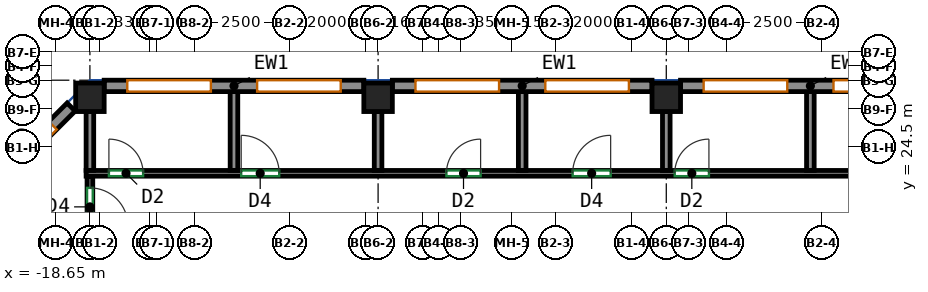
"""IFC4 building model, lengths in metres.
Left out: names, types, materials, properties, quantities, classifications, styles, units other than length and angle.
Written with IfcOpenShell. Run it as: python <this file> out.ifc"""

import sys

from ifc_helpers import new_model, si_unit, direction, frame, frame_2d, origin, origin_2d, place, context, subcontext, project, spatial, rectangle, extrude, source, transform, mapped, element, fill, save


model = new_model("IFC4")
c1 = context("Model", 3, precision=1e-05, world=origin(), true_north=direction((0.0, 1.0)))
c2 = subcontext(c1, "Body", "Model", "MODEL_VIEW")
j1 = project(units=[si_unit("LENGTHUNIT", "METRE"), si_unit("PLANEANGLEUNIT", "RADIAN")], contexts=[c1])
p1 = place(None, origin())
s1 = spatial("IfcSite", under=j1, at=p1, CompositionType="ELEMENT")
p2 = place(p1, origin())
s2 = spatial("IfcBuilding", under=s1, at=p2, CompositionType="ELEMENT")
p3 = place(p2, frame((0.0, 0.0, 203.3)))
s3 = spatial("IfcBuildingStorey", under=s2, at=p3, CompositionType="ELEMENT", Elevation=203.3)
m1 = source(origin(), c2, "Body", "SweptSolid", [
    extrude(rectangle(XDim=0.75, YDim=0.75, at=origin_2d()), origin(), (0.0, 0.0, 1.0), 3.12),
])
for number, where, z_axis, x_axis in (
    (1, (-17.75, 25.8, 0.0), (0.0, 0.0, 1.0), (1.0, 0.0, 0.0)),
    (2, (-10.167, 25.8, 0.0), (0.0, 0.0, 1.0), (1.0, 0.0, 0.0)),
    (3, (-2.583, 25.8, 0.0), (0.0, 0.0, 1.0), (1.0, 0.0, 0.0)),
):
    element("IfcColumn", number, at=place(p3, frame(where, z_axis=z_axis, x_axis=x_axis)), inside=s3, PredefinedType="COLUMN", context=c2, shape_type="MappedRepresentation", body=[
        mapped(m1, transform((0.0, 0.0, 0.0))),
    ])
m2 = source(origin(), c2, "Body", "SweptSolid", [
    extrude(rectangle(XDim=6.833, YDim=0.3, at=frame_2d((3.417, 0.0))), origin(), (0.0, 0.0, 1.0), 3.12),
])
p4 = place(p3, frame((4.625, 26.1, 0.0), z_axis=(0.0, 0.0, 1.0), x_axis=(-1.0, 0.0, 0.0)))
e4 = element("IfcWall", 4, at=p4, inside=s3, PredefinedType="SOLIDWALL", context=c2, shape_type="MappedRepresentation", body=[
    mapped(m2, transform((0.0, 0.0, 0.0))),
])
p5 = place(p4, frame((0.608, 0.0, 0.85)))
e5 = element("IfcOpeningElement", 5, at=p5, cuts=e4, PredefinedType="OPENING", context=c2, shape_type="SweptSolid", body=[
    extrude(rectangle(XDim=2.2, YDim=1.95, at=frame_2d((1.1, 0.975))), frame((0.0, 0.16, 0.0), z_axis=(0.0, -1.0, 0.0), x_axis=(1.0, 0.0, 0.0)), (0.0, 0.0, 1.0), 0.32),
])
p6 = place(p4, frame((4.025, 0.0, 0.85)))
e6 = element("IfcOpeningElement", 6, at=p6, cuts=e4, PredefinedType="OPENING", context=c2, shape_type="SweptSolid", body=[
    extrude(rectangle(XDim=2.2, YDim=1.95, at=frame_2d((1.1, 0.975))), frame((0.0, 0.16, 0.0), z_axis=(0.0, -1.0, 0.0), x_axis=(1.0, 0.0, 0.0)), (0.0, 0.0, 1.0), 0.32),
])
m3 = source(origin(), c2, "Body", "SweptSolid", [
    extrude(rectangle(XDim=6.833, YDim=0.3, at=frame_2d((3.417, 0.0))), origin(), (0.0, 0.0, 1.0), 3.12),
])
p7 = place(p3, frame((-2.958, 26.1, 0.0), z_axis=(0.0, 0.0, 1.0), x_axis=(-1.0, 0.0, 0.0)))
e7 = element("IfcWall", 7, at=p7, inside=s3, PredefinedType="SOLIDWALL", context=c2, shape_type="MappedRepresentation", body=[
    mapped(m3, transform((0.0, 0.0, 0.0))),
])
p8 = place(p7, frame((0.608, 0.0, 0.85)))
e8 = element("IfcOpeningElement", 8, at=p8, cuts=e7, PredefinedType="OPENING", context=c2, shape_type="SweptSolid", body=[
    extrude(rectangle(XDim=2.2, YDim=1.95, at=frame_2d((1.1, 0.975))), frame((0.0, 0.16, 0.0), z_axis=(0.0, -1.0, 0.0), x_axis=(1.0, 0.0, 0.0)), (0.0, 0.0, 1.0), 0.32),
])
p9 = place(p7, frame((4.025, 0.0, 0.85)))
e9 = element("IfcOpeningElement", 9, at=p9, cuts=e7, PredefinedType="OPENING", context=c2, shape_type="SweptSolid", body=[
    extrude(rectangle(XDim=2.2, YDim=1.95, at=frame_2d((1.1, 0.975))), frame((0.0, 0.16, 0.0), z_axis=(0.0, -1.0, 0.0), x_axis=(1.0, 0.0, 0.0)), (0.0, 0.0, 1.0), 0.32),
])
p10 = place(p3, frame((-10.542, 26.1, 0.0), z_axis=(0.0, 0.0, 1.0), x_axis=(-1.0, 0.0, 0.0)))
e10 = element("IfcWall", 10, at=p10, inside=s3, PredefinedType="SOLIDWALL", context=c2, shape_type="MappedRepresentation", body=[
    mapped(m2, transform((0.0, 0.0, 0.0))),
])
p11 = place(p10, frame((0.608, 0.0, 0.85)))
e11 = element("IfcOpeningElement", 11, at=p11, cuts=e10, PredefinedType="OPENING", context=c2, shape_type="SweptSolid", body=[
    extrude(rectangle(XDim=2.2, YDim=1.95, at=frame_2d((1.1, 0.975))), frame((0.0, 0.16, 0.0), z_axis=(0.0, -1.0, 0.0), x_axis=(1.0, 0.0, 0.0)), (0.0, 0.0, 1.0), 0.32),
])
p12 = place(p10, frame((4.025, 0.0, 0.85)))
e12 = element("IfcOpeningElement", 12, at=p12, cuts=e10, PredefinedType="OPENING", context=c2, shape_type="SweptSolid", body=[
    extrude(rectangle(XDim=2.2, YDim=1.95, at=frame_2d((1.1, 0.975))), frame((0.0, 0.16, 0.0), z_axis=(0.0, -1.0, 0.0), x_axis=(1.0, 0.0, 0.0)), (0.0, 0.0, 1.0), 0.32),
])
m4 = source(origin(), c2, "Body", "SweptSolid", [
    extrude(rectangle(XDim=3.571, YDim=0.3, at=frame_2d((1.786, 0.0))), origin(), (0.0, 0.0, 1.0), 3.12),
])
p13 = place(p3, frame((-18.244, 25.544, 0.0), z_axis=(0.0, 0.0, 1.0), x_axis=(-0.707072595841, -0.707140964879, 0.0)))
e13 = element("IfcWall", 13, at=p13, inside=s3, PredefinedType="SOLIDWALL", context=c2, shape_type="MappedRepresentation", body=[
    mapped(m4, transform((0.0, 0.0, 0.0))),
])
p14 = place(p13, frame((0.686, 0.0, 0.85)))
e14 = element("IfcOpeningElement", 14, at=p14, cuts=e13, PredefinedType="OPENING", context=c2, shape_type="SweptSolid", body=[
    extrude(rectangle(XDim=2.2, YDim=1.95, at=frame_2d((1.1, 0.975))), frame((0.0, 0.16, 0.0), z_axis=(0.0, -1.0, 0.0), x_axis=(1.0, 0.0, 0.0)), (0.0, 0.0, 1.0), 0.32),
])
p15 = place(p3, frame((-17.75, 23.725, 0.0), z_axis=(0.0, 0.0, 1.0), x_axis=(0.0, -1.0, 0.0)))
e15 = element("IfcWall", 15, at=p15, inside=s3, PredefinedType="PARTITIONING", context=c2, shape_type="SweptSolid", body=[
    extrude(rectangle(XDim=1.725, YDim=0.15, at=frame_2d((0.863, 0.0))), origin(), (0.0, 0.0, 1.0), 3.12),
])
p16 = place(p15, frame((0.308, 0.0, 0.0)))
e16 = element("IfcOpeningElement", 16, at=p16, cuts=e15, PredefinedType="OPENING", context=c2, shape_type="SweptSolid", body=[
    extrude(rectangle(XDim=1.0, YDim=2.1, at=frame_2d((0.5, 1.05))), frame((0.0, 0.085, 0.0), z_axis=(0.0, -1.0, 0.0), x_axis=(1.0, 0.0, 0.0)), (0.0, 0.0, 1.0), 0.17),
])
p17 = place(p3, frame((-17.85, 23.8, 0.0), z_axis=(0.0, 0.0, 1.0), x_axis=(1.0, 0.0, 0.0)))
e17 = element("IfcWall", 17, at=p17, inside=s3, PredefinedType="PARTITIONING", context=c2, shape_type="SweptSolid", body=[
    extrude(rectangle(XDim=45.7, YDim=0.15, at=frame_2d((22.85, 0.0))), origin(), (0.0, 0.0, 1.0), 3.12),
])
p18 = place(p17, frame((0.6, 0.0, 0.0)))
e18 = element("IfcOpeningElement", 18, at=p18, cuts=e17, PredefinedType="OPENING", context=c2, shape_type="SweptSolid", body=[
    extrude(rectangle(XDim=0.9, YDim=2.1, at=frame_2d((0.45, 1.05))), frame((0.0, 0.085, 0.0), z_axis=(0.0, -1.0, 0.0), x_axis=(1.0, 0.0, 0.0)), (0.0, 0.0, 1.0), 0.17),
])
p19 = place(p17, frame((4.081, 0.0, 0.0)))
e19 = element("IfcOpeningElement", 19, at=p19, cuts=e17, PredefinedType="OPENING", context=c2, shape_type="SweptSolid", body=[
    extrude(rectangle(XDim=1.0, YDim=2.1, at=frame_2d((0.5, 1.05))), frame((0.0, 0.085, 0.0), z_axis=(0.0, -1.0, 0.0), x_axis=(1.0, 0.0, 0.0)), (0.0, 0.0, 1.0), 0.17),
])
p20 = place(p17, frame((9.481, 0.0, 0.0)))
e20 = element("IfcOpeningElement", 20, at=p20, cuts=e17, PredefinedType="OPENING", context=c2, shape_type="SweptSolid", body=[
    extrude(rectangle(XDim=0.9, YDim=2.1, at=frame_2d((0.45, 1.05))), frame((0.0, 0.085, 0.0), z_axis=(0.0, -1.0, 0.0), x_axis=(1.0, 0.0, 0.0)), (0.0, 0.0, 1.0), 0.17),
])
p21 = place(p17, frame((12.803, 0.0, 0.0)))
e21 = element("IfcOpeningElement", 21, at=p21, cuts=e17, PredefinedType="OPENING", context=c2, shape_type="SweptSolid", body=[
    extrude(rectangle(XDim=1.0, YDim=2.1, at=frame_2d((0.5, 1.05))), frame((0.0, 0.085, 0.0), z_axis=(0.0, -1.0, 0.0), x_axis=(1.0, 0.0, 0.0)), (0.0, 0.0, 1.0), 0.17),
])
p22 = place(p17, frame((15.489, 0.0, 0.0)))
e22 = element("IfcOpeningElement", 22, at=p22, cuts=e17, PredefinedType="OPENING", context=c2, shape_type="SweptSolid", body=[
    extrude(rectangle(XDim=0.9, YDim=2.1, at=frame_2d((0.45, 1.05))), frame((0.0, 0.085, 0.0), z_axis=(0.0, -1.0, 0.0), x_axis=(1.0, 0.0, 0.0)), (0.0, 0.0, 1.0), 0.17),
])
p23 = place(p17, frame((21.244, 0.0, 0.0)))
e23 = element("IfcOpeningElement", 23, at=p23, cuts=e17, PredefinedType="OPENING", context=c2, shape_type="SweptSolid", body=[
    extrude(rectangle(XDim=0.9, YDim=2.1, at=frame_2d((0.45, 1.05))), frame((0.0, 0.085, 0.0), z_axis=(0.0, -1.0, 0.0), x_axis=(1.0, 0.0, 0.0)), (0.0, 0.0, 1.0), 0.17),
])
p24 = place(p17, frame((23.542, 0.0, 0.0)))
e24 = element("IfcOpeningElement", 24, at=p24, cuts=e17, PredefinedType="OPENING", context=c2, shape_type="SweptSolid", body=[
    extrude(rectangle(XDim=1.0, YDim=2.1, at=frame_2d((0.5, 1.05))), frame((0.0, 0.085, 0.0), z_axis=(0.0, -1.0, 0.0), x_axis=(1.0, 0.0, 0.0)), (0.0, 0.0, 1.0), 0.17),
])
p25 = place(p17, frame((28.841, 0.0, 0.0)))
e25 = element("IfcOpeningElement", 25, at=p25, cuts=e17, PredefinedType="OPENING", context=c2, shape_type="SweptSolid", body=[
    extrude(rectangle(XDim=0.9, YDim=2.1, at=frame_2d((0.45, 1.05))), frame((0.0, 0.085, 0.0), z_axis=(0.0, -1.0, 0.0), x_axis=(1.0, 0.0, 0.0)), (0.0, 0.0, 1.0), 0.17),
])
p26 = place(p17, frame((32.331, 0.0, 0.0)))
e26 = element("IfcOpeningElement", 26, at=p26, cuts=e17, PredefinedType="OPENING", context=c2, shape_type="SweptSolid", body=[
    extrude(rectangle(XDim=1.0, YDim=2.1, at=frame_2d((0.5, 1.05))), frame((0.0, 0.085, 0.0), z_axis=(0.0, -1.0, 0.0), x_axis=(1.0, 0.0, 0.0)), (0.0, 0.0, 1.0), 0.17),
])
p27 = place(p17, frame((35.42, 0.0, 0.0)))
e27 = element("IfcOpeningElement", 27, at=p27, cuts=e17, PredefinedType="OPENING", context=c2, shape_type="SweptSolid", body=[
    extrude(rectangle(XDim=0.9, YDim=2.1, at=frame_2d((0.45, 1.05))), frame((0.0, 0.085, 0.0), z_axis=(0.0, -1.0, 0.0), x_axis=(1.0, 0.0, 0.0)), (0.0, 0.0, 1.0), 0.17),
])
p28 = place(p17, frame((40.317, 0.0, 0.0)))
e28 = element("IfcOpeningElement", 28, at=p28, cuts=e17, PredefinedType="OPENING", context=c2, shape_type="SweptSolid", body=[
    extrude(rectangle(XDim=0.9, YDim=2.1, at=frame_2d((0.45, 1.05))), frame((0.0, 0.085, 0.0), z_axis=(0.0, -1.0, 0.0), x_axis=(1.0, 0.0, 0.0)), (0.0, 0.0, 1.0), 0.17),
])
p29 = place(p17, frame((43.199, 0.0, 0.0)))
e29 = element("IfcOpeningElement", 29, at=p29, cuts=e17, PredefinedType="OPENING", context=c2, shape_type="SweptSolid", body=[
    extrude(rectangle(XDim=1.0, YDim=2.1, at=frame_2d((0.5, 1.05))), frame((0.0, 0.085, 0.0), z_axis=(0.0, -1.0, 0.0), x_axis=(1.0, 0.0, 0.0)), (0.0, 0.0, 1.0), 0.17),
])
p30 = place(p3, frame((-17.75, 23.877, 0.0), z_axis=(0.0, 0.0, 1.0), x_axis=(0.0, 1.0, 0.0)))
e30 = element("IfcWall", 30, at=p30, inside=s3, PredefinedType="PARTITIONING", context=c2, shape_type="SweptSolid", body=[
    extrude(rectangle(XDim=1.548, YDim=0.2, at=frame_2d((0.774, 0.0))), origin(), (0.0, 0.0, 1.0), 3.12),
])
p31 = place(p3, frame((-13.959, 23.877, 0.0), z_axis=(0.0, 0.0, 1.0), x_axis=(0.0, 1.0, 0.0)))
e31 = element("IfcWall", 31, at=p31, inside=s3, PredefinedType="PARTITIONING", context=c2, shape_type="SweptSolid", body=[
    extrude(rectangle(XDim=2.123, YDim=0.2, at=frame_2d((1.062, 0.0))), origin(), (0.0, 0.0, 1.0), 3.12),
])
p32 = place(p3, frame((-10.167, 23.877, 0.0), z_axis=(0.0, 0.0, 1.0), x_axis=(0.0, 1.0, 0.0)))
e32 = element("IfcWall", 32, at=p32, inside=s3, PredefinedType="PARTITIONING", context=c2, shape_type="SweptSolid", body=[
    extrude(rectangle(XDim=1.548, YDim=0.2, at=frame_2d((0.774, 0.0))), origin(), (0.0, 0.0, 1.0), 3.12),
])
p33 = place(p3, frame((-6.375, 23.877, 0.0), z_axis=(0.0, 0.0, 1.0), x_axis=(0.0, 1.0, 0.0)))
e33 = element("IfcWall", 33, at=p33, inside=s3, PredefinedType="PARTITIONING", context=c2, shape_type="SweptSolid", body=[
    extrude(rectangle(XDim=2.123, YDim=0.2, at=frame_2d((1.062, 0.0))), origin(), (0.0, 0.0, 1.0), 3.12),
])
p34 = place(p3, frame((-2.583, 23.877, 0.0), z_axis=(0.0, 0.0, 1.0), x_axis=(0.0, 1.0, 0.0)))
e34 = element("IfcWall", 34, at=p34, inside=s3, PredefinedType="PARTITIONING", context=c2, shape_type="SweptSolid", body=[
    extrude(rectangle(XDim=1.548, YDim=0.2, at=frame_2d((0.774, 0.0))), origin(), (0.0, 0.0, 1.0), 3.12),
])
p35 = place(p3, frame((1.208, 23.877, 0.0), z_axis=(0.0, 0.0, 1.0), x_axis=(0.0, 1.0, 0.0)))
e35 = element("IfcWall", 35, at=p35, inside=s3, PredefinedType="PARTITIONING", context=c2, shape_type="SweptSolid", body=[
    extrude(rectangle(XDim=2.123, YDim=0.2, at=frame_2d((1.062, 0.0))), origin(), (0.0, 0.0, 1.0), 3.12),
])
p36 = place(p5, origin())
e36 = element("IfcWindow", 36, at=p36, inside=s3, PartitioningType="SINGLE_PANEL", PredefinedType="WINDOW", context=c2, shape_type="SweptSolid", body=[
    extrude(rectangle(XDim=2.2, YDim=1.95, at=frame_2d((1.1, 0.975))), frame((0.0, 0.03, 0.0), z_axis=(0.0, -1.0, 0.0), x_axis=(1.0, 0.0, 0.0)), (0.0, 0.0, 1.0), 0.06),
])
fill(e5, e36)
p37 = place(p6, origin())
e37 = element("IfcWindow", 37, at=p37, inside=s3, PartitioningType="SINGLE_PANEL", PredefinedType="WINDOW", context=c2, shape_type="SweptSolid", body=[
    extrude(rectangle(XDim=2.2, YDim=1.95, at=frame_2d((1.1, 0.975))), frame((0.0, 0.03, 0.0), z_axis=(0.0, -1.0, 0.0), x_axis=(1.0, 0.0, 0.0)), (0.0, 0.0, 1.0), 0.06),
])
fill(e6, e37)
p38 = place(p8, origin())
e38 = element("IfcWindow", 38, at=p38, inside=s3, PartitioningType="SINGLE_PANEL", PredefinedType="WINDOW", context=c2, shape_type="SweptSolid", body=[
    extrude(rectangle(XDim=2.2, YDim=1.95, at=frame_2d((1.1, 0.975))), frame((0.0, 0.03, 0.0), z_axis=(0.0, -1.0, 0.0), x_axis=(1.0, 0.0, 0.0)), (0.0, 0.0, 1.0), 0.06),
])
fill(e8, e38)
p39 = place(p9, origin())
e39 = element("IfcWindow", 39, at=p39, inside=s3, PartitioningType="SINGLE_PANEL", PredefinedType="WINDOW", context=c2, shape_type="SweptSolid", body=[
    extrude(rectangle(XDim=2.2, YDim=1.95, at=frame_2d((1.1, 0.975))), frame((0.0, 0.03, 0.0), z_axis=(0.0, -1.0, 0.0), x_axis=(1.0, 0.0, 0.0)), (0.0, 0.0, 1.0), 0.06),
])
fill(e9, e39)
p40 = place(p11, origin())
e40 = element("IfcWindow", 40, at=p40, inside=s3, PartitioningType="SINGLE_PANEL", PredefinedType="WINDOW", context=c2, shape_type="SweptSolid", body=[
    extrude(rectangle(XDim=2.2, YDim=1.95, at=frame_2d((1.1, 0.975))), frame((0.0, 0.03, 0.0), z_axis=(0.0, -1.0, 0.0), x_axis=(1.0, 0.0, 0.0)), (0.0, 0.0, 1.0), 0.06),
])
fill(e11, e40)
p41 = place(p12, origin())
e41 = element("IfcWindow", 41, at=p41, inside=s3, PartitioningType="SINGLE_PANEL", PredefinedType="WINDOW", context=c2, shape_type="SweptSolid", body=[
    extrude(rectangle(XDim=2.2, YDim=1.95, at=frame_2d((1.1, 0.975))), frame((0.0, 0.03, 0.0), z_axis=(0.0, -1.0, 0.0), x_axis=(1.0, 0.0, 0.0)), (0.0, 0.0, 1.0), 0.06),
])
fill(e12, e41)
p42 = place(p14, origin())
e42 = element("IfcWindow", 42, at=p42, inside=s3, PartitioningType="SINGLE_PANEL", PredefinedType="WINDOW", context=c2, shape_type="SweptSolid", body=[
    extrude(rectangle(XDim=2.2, YDim=1.95, at=frame_2d((1.1, 0.975))), frame((0.0, 0.03, 0.0), z_axis=(0.0, -1.0, 0.0), x_axis=(1.0, 0.0, 0.0)), (0.0, 0.0, 1.0), 0.06),
])
fill(e14, e42)
p43 = place(p16, origin())
e43 = element("IfcDoor", 43, at=p43, inside=s3, OperationType="SINGLE_SWING_RIGHT", PredefinedType="DOOR", context=c2, shape_type="SweptSolid", body=[
    extrude(rectangle(XDim=1.0, YDim=2.1, at=frame_2d((0.5, 1.05))), frame((0.0, 0.025, 0.0), z_axis=(0.0, -1.0, 0.0), x_axis=(1.0, 0.0, 0.0)), (0.0, 0.0, 1.0), 0.05),
])
fill(e16, e43)
p44 = place(p18, origin())
e44 = element("IfcDoor", 44, at=p44, inside=s3, OperationType="SINGLE_SWING_LEFT", PredefinedType="DOOR", context=c2, shape_type="SweptSolid", body=[
    extrude(rectangle(XDim=0.9, YDim=2.1, at=frame_2d((0.45, 1.05))), frame((0.0, 0.025, 0.0), z_axis=(0.0, -1.0, 0.0), x_axis=(1.0, 0.0, 0.0)), (0.0, 0.0, 1.0), 0.05),
])
fill(e18, e44)
p45 = place(p19, origin())
e45 = element("IfcDoor", 45, at=p45, inside=s3, OperationType="SINGLE_SWING_LEFT", PredefinedType="DOOR", context=c2, shape_type="SweptSolid", body=[
    extrude(rectangle(XDim=1.0, YDim=2.1, at=frame_2d((0.5, 1.05))), frame((0.0, 0.025, 0.0), z_axis=(0.0, -1.0, 0.0), x_axis=(1.0, 0.0, 0.0)), (0.0, 0.0, 1.0), 0.05),
])
fill(e19, e45)
p46 = place(p20, origin())
e46 = element("IfcDoor", 46, at=p46, inside=s3, OperationType="SINGLE_SWING_RIGHT", PredefinedType="DOOR", context=c2, shape_type="SweptSolid", body=[
    extrude(rectangle(XDim=0.9, YDim=2.1, at=frame_2d((0.45, 1.05))), frame((0.0, 0.025, 0.0), z_axis=(0.0, -1.0, 0.0), x_axis=(1.0, 0.0, 0.0)), (0.0, 0.0, 1.0), 0.05),
])
fill(e20, e46)
p47 = place(p21, origin())
e47 = element("IfcDoor", 47, at=p47, inside=s3, OperationType="SINGLE_SWING_RIGHT", PredefinedType="DOOR", context=c2, shape_type="SweptSolid", body=[
    extrude(rectangle(XDim=1.0, YDim=2.1, at=frame_2d((0.5, 1.05))), frame((0.0, 0.025, 0.0), z_axis=(0.0, -1.0, 0.0), x_axis=(1.0, 0.0, 0.0)), (0.0, 0.0, 1.0), 0.05),
])
fill(e21, e47)
p48 = place(p22, origin())
e48 = element("IfcDoor", 48, at=p48, inside=s3, OperationType="SINGLE_SWING_RIGHT", PredefinedType="DOOR", context=c2, shape_type="SweptSolid", body=[
    extrude(rectangle(XDim=0.9, YDim=2.1, at=frame_2d((0.45, 1.05))), frame((0.0, 0.025, 0.0), z_axis=(0.0, -1.0, 0.0), x_axis=(1.0, 0.0, 0.0)), (0.0, 0.0, 1.0), 0.05),
])
fill(e22, e48)
save(model, sys.argv[1])
